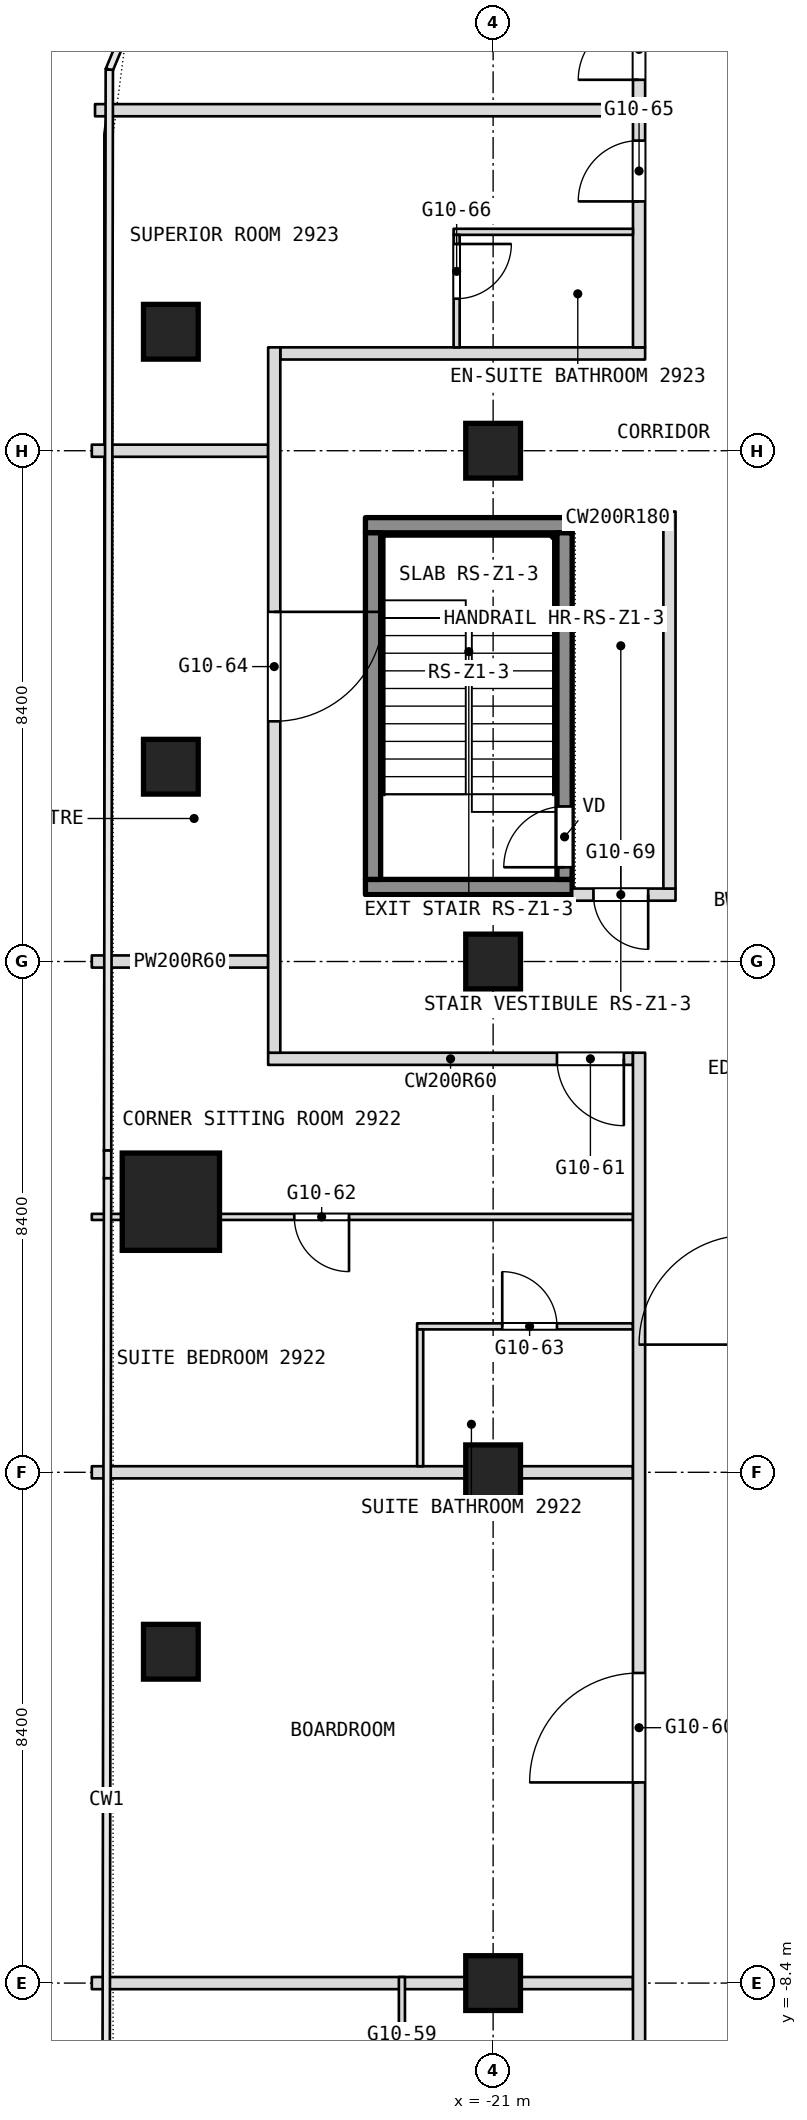
"""IFC4 building model, lengths in metres.
Left out: names, types, materials, properties, quantities, classifications, styles, units other than length and angle.
Written with IfcOpenShell. Run it as: python <this file> out.ifc"""

import sys

from ifc_helpers import new_model, si_unit, direction, frame, frame_2d, origin, origin_2d, place, context, subcontext, project, spatial, rectangle, extrude, element, fill, save


model = new_model("IFC4")
c1 = context("Model", 3, precision=1e-05, world=origin(), true_north=direction((0.0, 1.0)))
c2 = subcontext(c1, "Body", "Model", "MODEL_VIEW")
j1 = project(units=[si_unit("LENGTHUNIT", "METRE"), si_unit("PLANEANGLEUNIT", "RADIAN")], contexts=[c1])
p1 = place(None, origin())
s1 = spatial("IfcSite", under=j1, at=p1, CompositionType="ELEMENT")
p2 = place(p1, origin())
s2 = spatial("IfcBuilding", under=s1, at=p2, CompositionType="ELEMENT")
p3 = place(p2, frame((0.0, 0.0, 130.1)))
s3 = spatial("IfcBuildingStorey", under=s2, at=p3, CompositionType="ELEMENT", Elevation=130.1)
p4 = place(p3, frame((-26.3, 4.45, 0.0), z_axis=(0.0, 0.0, 1.0), x_axis=(1.0, 0.0, 0.0)))
e1 = element("IfcColumn", 1, at=p4, inside=s3, PredefinedType="COLUMN", context=c2, shape_type="SweptSolid", body=[
    extrude(rectangle(XDim=1.6, YDim=1.6, at=origin_2d()), origin(), (0.0, 0.0, 1.0), 3.6),
])
for number, where, z_axis, x_axis in (
    (2, (-21.0, -8.4, 0.0), (0.0, 0.0, 1.0), (1.0, 0.0, 0.0)),
    (3, (-21.0, 0.0, 0.0), (0.0, 0.0, 1.0), (1.0, 0.0, 0.0)),
    (4, (-21.0, 8.4, 0.0), (0.0, 0.0, 1.0), (1.0, 0.0, 0.0)),
    (5, (-21.0, 16.8, 0.0), (0.0, 0.0, 1.0), (1.0, 0.0, 0.0)),
    (6, (-26.3, -2.951, 0.0), (0.0, 0.0, 1.0), (1.0, 0.0, 0.0)),
    (7, (-26.3, 11.603, 0.0), (0.0, 0.0, 1.0), (1.0, 0.0, 0.0)),
    (8, (-26.3, 18.756, 0.0), (0.0, 0.0, 1.0), (1.0, 0.0, 0.0)),
):
    element("IfcColumn", number, at=place(p3, frame(where, z_axis=z_axis, x_axis=x_axis)), inside=s3, PredefinedType="COLUMN", context=c2, shape_type="SweptSolid", body=[
        extrude(rectangle(XDim=0.9, YDim=0.9, at=origin_2d()), origin(), (0.0, 0.0, 1.0), 3.6),
    ])
for number, where, z_axis, x_axis in (
    (9, (-27.6, -8.4, 0.0), (0.0, 0.0, 1.0), (1.0, 0.0, 0.0)),
    (10, (-27.6, 0.0, 0.0), (0.0, 0.0, 1.0), (1.0, 0.0, 0.0)),
):
    element("IfcWall", number, at=place(p3, frame(where, z_axis=z_axis, x_axis=x_axis)), inside=s3, PredefinedType="PARTITIONING", context=c2, shape_type="SweptSolid", body=[
        extrude(rectangle(XDim=8.9, YDim=0.2, at=frame_2d((4.45, 0.0))), origin(), (0.0, 0.0, 1.0), 2.89),
    ])
p5 = place(p3, frame((-22.25, 2.4, 0.0), z_axis=(0.0, 0.0, 1.0), x_axis=(1.0, 0.0, 0.0)))
e11 = element("IfcWall", 11, at=p5, inside=s3, PredefinedType="PARTITIONING", context=c2, shape_type="SweptSolid", body=[
    extrude(rectangle(XDim=3.55, YDim=0.1, at=frame_2d((1.775, 0.0))), origin(), (0.0, 0.0, 1.0), 3.34),
])
p6 = place(p5, frame((1.4, 0.0, 0.0)))
e12 = element("IfcOpeningElement", 12, at=p6, cuts=e11, PredefinedType="OPENING", context=c2, shape_type="SweptSolid", body=[
    extrude(rectangle(XDim=0.9, YDim=2.1, at=frame_2d((0.45, 1.05))), frame((0.0, 0.05, 0.0), z_axis=(0.0, -1.0, 0.0), x_axis=(1.0, 0.0, 0.0)), (0.0, 0.0, 1.0), 0.1),
])
p7 = place(p3, frame((-27.6, 4.2, 0.0), z_axis=(0.0, 0.0, 1.0), x_axis=(1.0, 0.0, 0.0)))
e13 = element("IfcWall", 13, at=p7, inside=s3, PredefinedType="PARTITIONING", context=c2, shape_type="SweptSolid", body=[
    extrude(rectangle(XDim=0.5, YDim=0.1, at=frame_2d((0.25, 0.0))), origin(), (0.0, 0.0, 1.0), 3.34),
])
p8 = place(p3, frame((-25.5, 4.2, 0.0), z_axis=(0.0, 0.0, 1.0), x_axis=(1.0, 0.0, 0.0)))
e14 = element("IfcWall", 14, at=p8, inside=s3, PredefinedType="PARTITIONING", context=c2, shape_type="SweptSolid", body=[
    extrude(rectangle(XDim=6.8, YDim=0.1, at=frame_2d((3.4, 0.0))), origin(), (0.0, 0.0, 1.0), 3.34),
])
p9 = place(p8, frame((1.23, 0.0, 0.0)))
e15 = element("IfcOpeningElement", 15, at=p9, cuts=e14, PredefinedType="OPENING", context=c2, shape_type="SweptSolid", body=[
    extrude(rectangle(XDim=0.9, YDim=2.1, at=frame_2d((0.45, 1.05))), frame((0.0, 0.05, 0.0), z_axis=(0.0, -1.0, 0.0), x_axis=(1.0, 0.0, 0.0)), (0.0, 0.0, 1.0), 0.1),
])
p10 = place(p3, frame((-24.7, 6.8, 0.0), z_axis=(0.0, 0.0, 1.0), x_axis=(1.0, 0.0, 0.0)))
e16 = element("IfcWall", 16, at=p10, inside=s3, PredefinedType="PARTITIONING", context=c2, shape_type="SweptSolid", body=[
    extrude(rectangle(XDim=6.0, YDim=0.2, at=frame_2d((3.0, 0.0))), origin(), (0.0, 0.0, 1.0), 3.34),
])
p11 = place(p10, frame((4.75, 0.0, 0.0)))
e17 = element("IfcOpeningElement", 17, at=p11, cuts=e16, PredefinedType="OPENING", context=c2, shape_type="SweptSolid", body=[
    extrude(rectangle(XDim=1.1, YDim=2.1, at=frame_2d((0.55, 1.05))), frame((0.0, 0.1, 0.0), z_axis=(0.0, -1.0, 0.0), x_axis=(1.0, 0.0, 0.0)), (0.0, 0.0, 1.0), 0.2),
])
p12 = place(p3, frame((-27.6, 8.4, 0.0), z_axis=(0.0, 0.0, 1.0), x_axis=(1.0, 0.0, 0.0)))
e18 = element("IfcWall", 18, at=p12, inside=s3, PredefinedType="PARTITIONING", context=c2, shape_type="SweptSolid", body=[
    extrude(rectangle(XDim=2.9, YDim=0.2, at=frame_2d((1.45, 0.0))), origin(), (0.0, 0.0, 1.0), 2.89),
])
p13 = place(p3, frame((-19.7, 9.5, 0.0), z_axis=(0.0, 0.0, 1.0), x_axis=(1.0, 0.0, 0.0)))
e19 = element("IfcWall", 19, at=p13, inside=s3, PredefinedType="PARTITIONING", context=c2, shape_type="SweptSolid", body=[
    extrude(rectangle(XDim=1.7, YDim=0.2, at=frame_2d((0.85, 0.0))), origin(), (0.0, 0.0, 1.0), 3.34),
])
p14 = place(p13, frame((0.35, 0.0, 0.0)))
e20 = element("IfcOpeningElement", 20, at=p14, cuts=e19, PredefinedType="OPENING", context=c2, shape_type="SweptSolid", body=[
    extrude(rectangle(XDim=0.9, YDim=2.1, at=frame_2d((0.45, 1.05))), frame((0.0, 0.1, 0.0), z_axis=(0.0, -1.0, 0.0), x_axis=(1.0, 0.0, 0.0)), (0.0, 0.0, 1.0), 0.2),
])
p15 = place(p3, frame((-19.7, 15.7, 0.0), z_axis=(0.0, 0.0, 1.0), x_axis=(1.0, 0.0, 0.0)))
e21 = element("IfcWall", 21, at=p15, inside=s3, PredefinedType="PARTITIONING", context=c2, shape_type="SweptSolid", body=[
    extrude(rectangle(XDim=1.5, YDim=0.2, at=frame_2d((0.75, 0.0))), origin(), (0.0, 0.0, 1.0), 3.34),
])
p16 = place(p3, frame((-27.6, 16.8, 0.0), z_axis=(0.0, 0.0, 1.0), x_axis=(1.0, 0.0, 0.0)))
e22 = element("IfcWall", 22, at=p16, inside=s3, PredefinedType="PARTITIONING", context=c2, shape_type="SweptSolid", body=[
    extrude(rectangle(XDim=2.9, YDim=0.2, at=frame_2d((1.45, 0.0))), origin(), (0.0, 0.0, 1.0), 2.89),
])
p17 = place(p3, frame((-18.1, 9.6, 0.0), z_axis=(0.0, 0.0, 1.0), x_axis=(0.0, 1.0, 0.0)))
e23 = element("IfcWall", 23, at=p17, inside=s3, PredefinedType="PARTITIONING", context=c2, shape_type="SweptSolid", body=[
    extrude(rectangle(XDim=6.2, YDim=0.2, at=frame_2d((3.1, 0.0))), origin(), (0.0, 0.0, 1.0), 3.34),
])
p18 = place(p3, frame((-24.5, 18.4, 0.0), z_axis=(0.0, 0.0, 1.0), x_axis=(1.0, 0.0, 0.0)))
e24 = element("IfcWall", 24, at=p18, inside=s3, PredefinedType="PARTITIONING", context=c2, shape_type="SweptSolid", body=[
    extrude(rectangle(XDim=6.0, YDim=0.2, at=frame_2d((3.0, 0.0))), origin(), (0.0, 0.0, 1.0), 3.34),
])
p19 = place(p3, frame((-18.6, -21.708, 0.0), z_axis=(0.0, 0.0, 1.0), x_axis=(0.0, 1.0, 0.0)))
e25 = element("IfcWall", 25, at=p19, inside=s3, PredefinedType="PARTITIONING", context=c2, shape_type="SweptSolid", body=[
    extrude(rectangle(XDim=28.608, YDim=0.2, at=frame_2d((14.304, 0.0))), origin(), (0.0, 0.0, 1.0), 3.34),
])
p20 = place(p19, frame((2.054, 0.0, 0.0)))
e26 = element("IfcOpeningElement", 26, at=p20, cuts=e25, PredefinedType="OPENING", context=c2, shape_type="SweptSolid", body=[
    extrude(rectangle(XDim=0.9, YDim=2.1, at=frame_2d((0.45, 1.05))), frame((0.0, 0.1, 0.0), z_axis=(0.0, -1.0, 0.0), x_axis=(1.0, 0.0, 0.0)), (0.0, 0.0, 1.0), 0.2),
])
p21 = place(p19, frame((7.708, 0.0, 0.0)))
e27 = element("IfcOpeningElement", 27, at=p21, cuts=e25, PredefinedType="OPENING", context=c2, shape_type="SweptSolid", body=[
    extrude(rectangle(XDim=1.0, YDim=2.1, at=frame_2d((0.5, 1.05))), frame((0.0, 0.1, 0.0), z_axis=(0.0, -1.0, 0.0), x_axis=(1.0, 0.0, 0.0)), (0.0, 0.0, 1.0), 0.2),
])
p22 = place(p19, frame((9.508, 0.0, 0.0)))
e28 = element("IfcOpeningElement", 28, at=p22, cuts=e25, PredefinedType="OPENING", context=c2, shape_type="SweptSolid", body=[
    extrude(rectangle(XDim=1.0, YDim=2.1, at=frame_2d((0.5, 1.05))), frame((0.0, 0.1, 0.0), z_axis=(0.0, -1.0, 0.0), x_axis=(1.0, 0.0, 0.0)), (0.0, 0.0, 1.0), 0.2),
])
p23 = place(p19, frame((16.608, 0.0, 0.0)))
e29 = element("IfcOpeningElement", 29, at=p23, cuts=e25, PredefinedType="OPENING", context=c2, shape_type="SweptSolid", body=[
    extrude(rectangle(XDim=1.8, YDim=2.1, at=frame_2d((0.9, 1.05))), frame((0.0, 0.1, 0.0), z_axis=(0.0, -1.0, 0.0), x_axis=(1.0, 0.0, 0.0)), (0.0, 0.0, 1.0), 0.2),
])
p24 = place(p3, frame((-18.6, 18.5, 0.0), z_axis=(0.0, 0.0, 1.0), x_axis=(0.0, 1.0, 0.0)))
e30 = element("IfcWall", 30, at=p24, inside=s3, PredefinedType="PARTITIONING", context=c2, shape_type="SweptSolid", body=[
    extrude(rectangle(XDim=9.44, YDim=0.2, at=frame_2d((4.72, 0.0))), origin(), (0.0, 0.0, 1.0), 3.34),
])
p25 = place(p24, frame((2.4, 0.0, 0.0)))
e31 = element("IfcOpeningElement", 31, at=p25, cuts=e30, PredefinedType="OPENING", context=c2, shape_type="SweptSolid", body=[
    extrude(rectangle(XDim=1.0, YDim=2.1, at=frame_2d((0.5, 1.05))), frame((0.0, 0.1, 0.0), z_axis=(0.0, -1.0, 0.0), x_axis=(1.0, 0.0, 0.0)), (0.0, 0.0, 1.0), 0.2),
])
p26 = place(p24, frame((4.4, 0.0, 0.0)))
e32 = element("IfcOpeningElement", 32, at=p26, cuts=e30, PredefinedType="OPENING", context=c2, shape_type="SweptSolid", body=[
    extrude(rectangle(XDim=1.0, YDim=2.1, at=frame_2d((0.5, 1.05))), frame((0.0, 0.1, 0.0), z_axis=(0.0, -1.0, 0.0), x_axis=(1.0, 0.0, 0.0)), (0.0, 0.0, 1.0), 0.2),
])
p27 = place(p3, frame((-21.65, 20.4, 0.0), z_axis=(0.0, 0.0, 1.0), x_axis=(1.0, 0.0, 0.0)))
e33 = element("IfcWall", 33, at=p27, inside=s3, PredefinedType="PARTITIONING", context=c2, shape_type="SweptSolid", body=[
    extrude(rectangle(XDim=2.95, YDim=0.1, at=frame_2d((1.475, 0.0))), origin(), (0.0, 0.0, 1.0), 3.34),
])
p28 = place(p3, frame((-21.6, 18.5, 0.0), z_axis=(0.0, 0.0, 1.0), x_axis=(0.0, 1.0, 0.0)))
e34 = element("IfcWall", 34, at=p28, inside=s3, PredefinedType="PARTITIONING", context=c2, shape_type="SweptSolid", body=[
    extrude(rectangle(XDim=1.85, YDim=0.1, at=frame_2d((0.925, 0.0))), origin(), (0.0, 0.0, 1.0), 3.34),
])
p29 = place(p28, frame((0.8, 0.0, 0.0)))
e35 = element("IfcOpeningElement", 35, at=p29, cuts=e34, PredefinedType="OPENING", context=c2, shape_type="SweptSolid", body=[
    extrude(rectangle(XDim=0.9, YDim=2.1, at=frame_2d((0.45, 1.05))), frame((0.0, 0.05, 0.0), z_axis=(0.0, -1.0, 0.0), x_axis=(1.0, 0.0, 0.0)), (0.0, 0.0, 1.0), 0.1),
])
p30 = place(p3, frame((-22.2, 0.1, 0.0), z_axis=(0.0, 0.0, 1.0), x_axis=(0.0, 1.0, 0.0)))
e36 = element("IfcWall", 36, at=p30, inside=s3, PredefinedType="PARTITIONING", context=c2, shape_type="SweptSolid", body=[
    extrude(rectangle(XDim=2.25, YDim=0.1, at=frame_2d((1.125, 0.0))), origin(), (0.0, 0.0, 1.0), 3.34),
])
p31 = place(p3, frame((-27.547, 22.4, 0.0), z_axis=(0.0, 0.0, 1.0), x_axis=(1.0, 0.0, 0.0)))
e37 = element("IfcWall", 37, at=p31, inside=s3, PredefinedType="PARTITIONING", context=c2, shape_type="SweptSolid", body=[
    extrude(rectangle(XDim=8.847, YDim=0.2, at=frame_2d((4.424, 0.0))), origin(), (0.0, 0.0, 1.0), 3.34),
])
p32 = place(p3, frame((-22.5, -10.85, 0.0), z_axis=(0.0, 0.0, 1.0), x_axis=(0.0, 1.0, 0.0)))
e38 = element("IfcWall", 38, at=p32, inside=s3, PredefinedType="PARTITIONING", context=c2, shape_type="SweptSolid", body=[
    extrude(rectangle(XDim=2.55, YDim=0.1, at=frame_2d((1.275, 0.0))), origin(), (0.0, 0.0, 1.0), 3.34),
])
p33 = place(p32, frame((0.15, 0.0, 0.0)))
e39 = element("IfcOpeningElement", 39, at=p33, cuts=e38, PredefinedType="OPENING", context=c2, shape_type="SweptSolid", body=[
    extrude(rectangle(XDim=0.9, YDim=2.1, at=frame_2d((0.45, 1.05))), frame((0.0, 0.05, 0.0), z_axis=(0.0, -1.0, 0.0), x_axis=(1.0, 0.0, 0.0)), (0.0, 0.0, 1.0), 0.1),
])
p34 = place(p3, frame((-24.6, 6.9, 0.0), z_axis=(0.0, 0.0, 1.0), x_axis=(0.0, 1.0, 0.0)))
e40 = element("IfcWall", 40, at=p34, inside=s3, PredefinedType="PARTITIONING", context=c2, shape_type="SweptSolid", body=[
    extrude(rectangle(XDim=11.6, YDim=0.2, at=frame_2d((5.8, 0.0))), origin(), (0.0, 0.0, 1.0), 3.34),
])
p35 = place(p34, frame((5.45, 0.0, 0.0)))
e41 = element("IfcOpeningElement", 41, at=p35, cuts=e40, PredefinedType="OPENING", context=c2, shape_type="SweptSolid", body=[
    extrude(rectangle(XDim=1.8, YDim=2.1, at=frame_2d((0.9, 1.05))), frame((0.0, 0.1, 0.0), z_axis=(0.0, -1.0, 0.0), x_axis=(1.0, 0.0, 0.0)), (0.0, 0.0, 1.0), 0.2),
])
for number, where, z_axis, x_axis in (
    (42, (-23.1, 9.625, 0.1), (0.0, 0.0, 1.0), (1.0, 0.0, 0.0)),
    (43, (-23.1, 15.575, 0.1), (0.0, 0.0, 1.0), (1.0, 0.0, 0.0)),
):
    element("IfcWall", number, at=place(p3, frame(where, z_axis=z_axis, x_axis=x_axis)), inside=s3, PredefinedType="SHEAR", context=c2, shape_type="SweptSolid", body=[
        extrude(rectangle(XDim=3.4, YDim=0.25, at=frame_2d((1.7, 0.0))), origin(), (0.0, 0.0, 1.0), 3.6),
    ])
p36 = place(p3, frame((-22.975, 9.75, 0.1), z_axis=(0.0, 0.0, 1.0), x_axis=(0.0, 1.0, 0.0)))
e44 = element("IfcWall", 44, at=p36, inside=s3, PredefinedType="SHEAR", context=c2, shape_type="SweptSolid", body=[
    extrude(rectangle(XDim=5.7, YDim=0.25, at=frame_2d((2.85, 0.0))), origin(), (0.0, 0.0, 1.0), 3.6),
])
p37 = place(p3, frame((-19.825, 9.75, 0.1), z_axis=(0.0, 0.0, 1.0), x_axis=(0.0, 1.0, 0.0)))
e45 = element("IfcWall", 45, at=p37, inside=s3, PredefinedType="SHEAR", context=c2, shape_type="SweptSolid", body=[
    extrude(rectangle(XDim=5.7, YDim=0.25, at=frame_2d((2.85, 0.0))), origin(), (0.0, 0.0, 1.0), 3.6),
])
p38 = place(p37, frame((0.2, 0.0, 0.0)))
e46 = element("IfcOpeningElement", 46, at=p38, cuts=e45, PredefinedType="OPENING", context=c2, shape_type="SweptSolid", body=[
    extrude(rectangle(XDim=1.0, YDim=2.1, at=frame_2d((0.5, 1.05))), frame((0.0, 0.125, 0.0), z_axis=(0.0, -1.0, 0.0), x_axis=(1.0, 0.0, 0.0)), (0.0, 0.0, 1.0), 0.25),
])
p39 = place(p6, origin())
e47 = element("IfcDoor", 47, at=p39, inside=s3, OperationType="SINGLE_SWING_LEFT", PredefinedType="DOOR", context=c2, shape_type="SweptSolid", body=[
    extrude(rectangle(XDim=0.9, YDim=2.1, at=frame_2d((0.45, 1.05))), frame((0.0, 0.025, 0.0), z_axis=(0.0, -1.0, 0.0), x_axis=(1.0, 0.0, 0.0)), (0.0, 0.0, 1.0), 0.05),
])
fill(e12, e47)
p40 = place(p9, origin())
e48 = element("IfcDoor", 48, at=p40, inside=s3, OperationType="SINGLE_SWING_RIGHT", PredefinedType="DOOR", context=c2, shape_type="SweptSolid", body=[
    extrude(rectangle(XDim=0.9, YDim=2.1, at=frame_2d((0.45, 1.05))), frame((0.0, 0.025, 0.0), z_axis=(0.0, -1.0, 0.0), x_axis=(1.0, 0.0, 0.0)), (0.0, 0.0, 1.0), 0.05),
])
fill(e15, e48)
p41 = place(p11, origin())
e49 = element("IfcDoor", 49, at=p41, inside=s3, OperationType="SINGLE_SWING_LEFT", PredefinedType="DOOR", context=c2, shape_type="SweptSolid", body=[
    extrude(rectangle(XDim=1.1, YDim=2.1, at=frame_2d((0.55, 1.05))), frame((0.0, 0.025, 0.0), z_axis=(0.0, -1.0, 0.0), x_axis=(1.0, 0.0, 0.0)), (0.0, 0.0, 1.0), 0.05),
])
fill(e17, e49)
p42 = place(p14, origin())
e50 = element("IfcDoor", 50, at=p42, inside=s3, OperationType="SINGLE_SWING_RIGHT", PredefinedType="DOOR", context=c2, shape_type="SweptSolid", body=[
    extrude(rectangle(XDim=0.9, YDim=2.1, at=frame_2d((0.45, 1.05))), frame((0.0, 0.025, 0.0), z_axis=(0.0, -1.0, 0.0), x_axis=(1.0, 0.0, 0.0)), (0.0, 0.0, 1.0), 0.05),
])
fill(e20, e50)
p43 = place(p23, origin())
e51 = element("IfcDoor", 51, at=p43, inside=s3, OperationType="DOUBLE_DOOR_SINGLE_SWING", PredefinedType="DOOR", context=c2, shape_type="SweptSolid", body=[
    extrude(rectangle(XDim=1.8, YDim=2.1, at=frame_2d((0.9, 1.05))), frame((0.0, 0.025, 0.0), z_axis=(0.0, -1.0, 0.0), x_axis=(1.0, 0.0, 0.0)), (0.0, 0.0, 1.0), 0.05),
])
fill(e29, e51)
p44 = place(p25, origin())
e52 = element("IfcDoor", 52, at=p44, inside=s3, OperationType="SINGLE_SWING_RIGHT", PredefinedType="DOOR", context=c2, shape_type="SweptSolid", body=[
    extrude(rectangle(XDim=1.0, YDim=2.1, at=frame_2d((0.5, 1.05))), frame((0.0, 0.025, 0.0), z_axis=(0.0, -1.0, 0.0), x_axis=(1.0, 0.0, 0.0)), (0.0, 0.0, 1.0), 0.05),
])
fill(e31, e52)
p45 = place(p26, origin())
e53 = element("IfcDoor", 53, at=p45, inside=s3, OperationType="SINGLE_SWING_RIGHT", PredefinedType="DOOR", context=c2, shape_type="SweptSolid", body=[
    extrude(rectangle(XDim=1.0, YDim=2.1, at=frame_2d((0.5, 1.05))), frame((0.0, 0.025, 0.0), z_axis=(0.0, -1.0, 0.0), x_axis=(1.0, 0.0, 0.0)), (0.0, 0.0, 1.0), 0.05),
])
fill(e32, e53)
p46 = place(p29, origin())
e54 = element("IfcDoor", 54, at=p46, inside=s3, OperationType="SINGLE_SWING_LEFT", PredefinedType="DOOR", context=c2, shape_type="SweptSolid", body=[
    extrude(rectangle(XDim=0.9, YDim=2.1, at=frame_2d((0.45, 1.05))), frame((0.0, 0.025, 0.0), z_axis=(0.0, -1.0, 0.0), x_axis=(1.0, 0.0, 0.0)), (0.0, 0.0, 1.0), 0.05),
])
fill(e35, e54)
p47 = place(p35, origin())
e55 = element("IfcDoor", 55, at=p47, inside=s3, OperationType="DOUBLE_DOOR_SINGLE_SWING", PredefinedType="DOOR", context=c2, shape_type="SweptSolid", body=[
    extrude(rectangle(XDim=1.8, YDim=2.1, at=frame_2d((0.9, 1.05))), frame((0.0, 0.025, 0.0), z_axis=(0.0, -1.0, 0.0), x_axis=(1.0, 0.0, 0.0)), (0.0, 0.0, 1.0), 0.05),
])
fill(e41, e55)
p48 = place(p38, origin())
e56 = element("IfcDoor", 56, at=p48, inside=s3, OperationType="SINGLE_SWING_LEFT", PredefinedType="DOOR", context=c2, shape_type="SweptSolid", body=[
    extrude(rectangle(XDim=1.0, YDim=2.1, at=frame_2d((0.5, 1.05))), frame((0.0, 0.025, 0.0), z_axis=(0.0, -1.0, 0.0), x_axis=(1.0, 0.0, 0.0)), (0.0, 0.0, 1.0), 0.05),
])
fill(e46, e56)
save(model, sys.argv[1])
